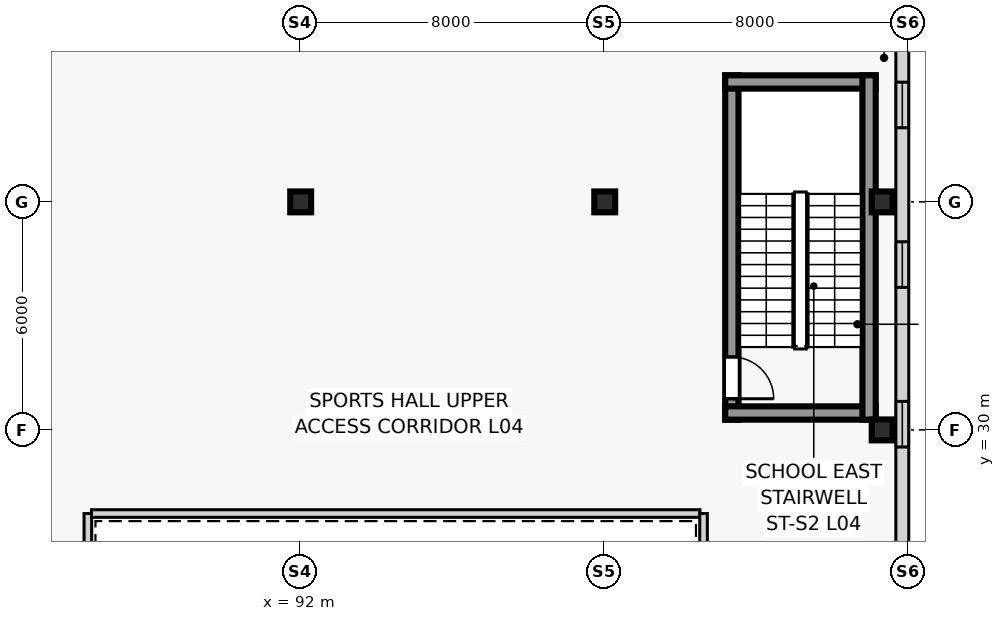
"""IFC4 building model, lengths in metres.
Left out: names, types, materials, properties, quantities, classifications, styles, units other than length and angle.
Written with IfcOpenShell. Run it as: python <this file> out.ifc"""

import sys

from ifc_helpers import new_model, si_unit, direction, frame, frame_2d, origin, origin_2d, place, context, subcontext, project, spatial, rectangle, extrude, source, transform, mapped, element, fill, save


model = new_model("IFC4")
c1 = context("Model", 3, precision=1e-05, world=origin(), true_north=direction((0.0, 1.0)))
c2 = subcontext(c1, "Body", "Model", "MODEL_VIEW")
j1 = project(units=[si_unit("LENGTHUNIT", "METRE"), si_unit("PLANEANGLEUNIT", "RADIAN")], contexts=[c1])
p1 = place(None, origin())
s1 = spatial("IfcSite", under=j1, at=p1, CompositionType="ELEMENT")
p2 = place(p1, origin())
s2 = spatial("IfcBuilding", under=s1, at=p2, CompositionType="ELEMENT")
p3 = place(p2, frame((0.0, 0.0, 18.0)))
s3 = spatial("IfcBuildingStorey", under=s2, at=p3, CompositionType="ELEMENT", Elevation=18.0)
p4 = place(p3, frame((103.345, 30.27, 0.0), z_axis=(0.0, 0.0, 1.0), x_axis=(0.0, 1.0, 0.0)))
e1 = element("IfcWall", 1, at=p4, inside=s3, PredefinedType="SHEAR", context=c2, shape_type="SweptSolid", body=[
    extrude(rectangle(XDim=9.06, YDim=0.35, at=frame_2d((4.53, 0.0))), origin(), (0.0, 0.0, 1.0), 4.5),
])
p5 = place(p4, frame((0.55, 0.0, 0.0)))
e2 = element("IfcOpeningElement", 2, at=p5, cuts=e1, PredefinedType="OPENING", context=c2, shape_type="SweptSolid", body=[
    extrude(rectangle(XDim=1.1, YDim=2.2, at=frame_2d((0.55, 1.1))), frame((0.0, 0.185, 0.0), z_axis=(0.0, -1.0, 0.0), x_axis=(1.0, 0.0, 0.0)), (0.0, 0.0, 1.0), 0.37),
])
for number, where, z_axis, x_axis in (
    (3, (103.17, 30.445, 0.0), (0.0, 0.0, 1.0), (1.0, 0.0, 0.0)),
    (4, (103.17, 39.155, 0.0), (0.0, 0.0, 1.0), (1.0, 0.0, 0.0)),
):
    element("IfcWall", number, at=place(p3, frame(where, z_axis=z_axis, x_axis=x_axis)), inside=s3, PredefinedType="SHEAR", context=c2, shape_type="SweptSolid", body=[
        extrude(rectangle(XDim=3.96, YDim=0.35, at=frame_2d((1.98, 0.0))), origin(), (0.0, 0.0, 1.0), 4.5),
    ])
p6 = place(p3, frame((106.955, 30.27, 0.0), z_axis=(0.0, 0.0, 1.0), x_axis=(0.0, 1.0, 0.0)))
e5 = element("IfcWall", 5, at=p6, inside=s3, PredefinedType="SHEAR", context=c2, shape_type="SweptSolid", body=[
    extrude(rectangle(XDim=9.06, YDim=0.35, at=frame_2d((4.53, 0.0))), origin(), (0.0, 0.0, 1.0), 4.5),
])
m1 = source(origin(), c2, "Body", "SweptSolid", [
    extrude(rectangle(XDim=0.55, YDim=0.55, at=origin_2d()), origin(), (0.0, 0.0, 1.0), 4.5),
])
for number, where, z_axis, x_axis in (
    (6, (92.0, 36.0, 0.0), (0.0, 0.0, 1.0), (1.0, 0.0, 0.0)),
    (7, (100.0, 36.0, 0.0), (0.0, 0.0, 1.0), (1.0, 0.0, 0.0)),
    (8, (107.3, 30.0, 0.0), (0.0, 0.0, 1.0), (1.0, 0.0, 0.0)),
    (9, (107.3, 36.0, 0.0), (0.0, 0.0, 1.0), (1.0, 0.0, 0.0)),
):
    element("IfcColumn", number, at=place(p3, frame(where, z_axis=z_axis, x_axis=x_axis)), inside=s3, PredefinedType="COLUMN", context=c2, shape_type="MappedRepresentation", body=[
        mapped(m1, transform((0.0, 0.0, 0.0), scale=1.0)),
    ])
p7 = place(p3, frame((107.83, 10.07, 0.0), z_axis=(0.0, 0.0, 1.0), x_axis=(0.0, 1.0, 0.0)))
e10 = element("IfcWall", 10, at=p7, inside=s3, PredefinedType="SOLIDWALL", context=c2, shape_type="SweptSolid", body=[
    extrude(rectangle(XDim=31.76, YDim=0.34, at=frame_2d((15.88, 0.0))), origin(), (0.0, 0.0, 1.0), 4.2),
])
p8 = place(p7, frame((2.68, 0.0, 0.95)))
e11 = element("IfcOpeningElement", 11, at=p8, cuts=e10, PredefinedType="OPENING", context=c2, shape_type="SweptSolid", body=[
    extrude(rectangle(XDim=1.2, YDim=1.5, at=frame_2d((0.6, 0.75))), frame((0.0, 0.18, 0.0), z_axis=(0.0, -1.0, 0.0), x_axis=(1.0, 0.0, 0.0)), (0.0, 0.0, 1.0), 0.36),
])
p9 = place(p7, frame((6.88, 0.0, 0.95)))
e12 = element("IfcOpeningElement", 12, at=p9, cuts=e10, PredefinedType="OPENING", context=c2, shape_type="SweptSolid", body=[
    extrude(rectangle(XDim=1.2, YDim=1.5, at=frame_2d((0.6, 0.75))), frame((0.0, 0.18, 0.0), z_axis=(0.0, -1.0, 0.0), x_axis=(1.0, 0.0, 0.0)), (0.0, 0.0, 1.0), 0.36),
])
p10 = place(p7, frame((11.08, 0.0, 0.95)))
e13 = element("IfcOpeningElement", 13, at=p10, cuts=e10, PredefinedType="OPENING", context=c2, shape_type="SweptSolid", body=[
    extrude(rectangle(XDim=1.2, YDim=1.5, at=frame_2d((0.6, 0.75))), frame((0.0, 0.18, 0.0), z_axis=(0.0, -1.0, 0.0), x_axis=(1.0, 0.0, 0.0)), (0.0, 0.0, 1.0), 0.36),
])
p11 = place(p7, frame((15.28, 0.0, 0.95)))
e14 = element("IfcOpeningElement", 14, at=p11, cuts=e10, PredefinedType="OPENING", context=c2, shape_type="SweptSolid", body=[
    extrude(rectangle(XDim=1.2, YDim=1.5, at=frame_2d((0.6, 0.75))), frame((0.0, 0.18, 0.0), z_axis=(0.0, -1.0, 0.0), x_axis=(1.0, 0.0, 0.0)), (0.0, 0.0, 1.0), 0.36),
])
p12 = place(p7, frame((19.48, 0.0, 0.95)))
e15 = element("IfcOpeningElement", 15, at=p12, cuts=e10, PredefinedType="OPENING", context=c2, shape_type="SweptSolid", body=[
    extrude(rectangle(XDim=1.2, YDim=1.5, at=frame_2d((0.6, 0.75))), frame((0.0, 0.18, 0.0), z_axis=(0.0, -1.0, 0.0), x_axis=(1.0, 0.0, 0.0)), (0.0, 0.0, 1.0), 0.36),
])
p13 = place(p7, frame((23.68, 0.0, 0.95)))
e16 = element("IfcOpeningElement", 16, at=p13, cuts=e10, PredefinedType="OPENING", context=c2, shape_type="SweptSolid", body=[
    extrude(rectangle(XDim=1.2, YDim=1.5, at=frame_2d((0.6, 0.75))), frame((0.0, 0.18, 0.0), z_axis=(0.0, -1.0, 0.0), x_axis=(1.0, 0.0, 0.0)), (0.0, 0.0, 1.0), 0.36),
])
p14 = place(p7, frame((27.88, 0.0, 0.95)))
e17 = element("IfcOpeningElement", 17, at=p14, cuts=e10, PredefinedType="OPENING", context=c2, shape_type="SweptSolid", body=[
    extrude(rectangle(XDim=1.2, YDim=1.5, at=frame_2d((0.6, 0.75))), frame((0.0, 0.18, 0.0), z_axis=(0.0, -1.0, 0.0), x_axis=(1.0, 0.0, 0.0)), (0.0, 0.0, 1.0), 0.36),
])
p15 = place(p3, frame((86.4, 13.8, 0.0), z_axis=(0.0, 0.0, 1.0), x_axis=(0.0, 1.0, 0.0)))
e18 = element("IfcWall", 18, at=p15, inside=s3, PredefinedType="PARTITIONING", context=c2, shape_type="SweptSolid", body=[
    extrude(rectangle(XDim=14.0, YDim=0.2, at=frame_2d((7.0, 0.0))), origin(), (0.0, 0.0, 1.0), 4.19),
])
p16 = place(p3, frame((86.495, 27.8, 0.0), z_axis=(0.0, 0.0, 1.0), x_axis=(1.0, 0.0, 0.0)))
e19 = element("IfcWall", 19, at=p16, inside=s3, PredefinedType="PARTITIONING", context=c2, shape_type="SweptSolid", body=[
    extrude(rectangle(XDim=16.01, YDim=0.2, at=frame_2d((8.005, 0.0))), origin(), (0.0, 0.0, 1.0), 4.19),
])
p17 = place(p3, frame((102.6, 13.8, 0.0), z_axis=(0.0, 0.0, 1.0), x_axis=(0.0, 1.0, 0.0)))
e20 = element("IfcWall", 20, at=p17, inside=s3, PredefinedType="PARTITIONING", context=c2, shape_type="SweptSolid", body=[
    extrude(rectangle(XDim=14.0, YDim=0.2, at=frame_2d((7.0, 0.0))), origin(), (0.0, 0.0, 1.0), 4.19),
])
m2 = source(origin(), c2, "Body", "SweptSolid", [
    extrude(rectangle(XDim=1.2, YDim=1.5, at=frame_2d((0.6, 0.75))), frame((0.0, 0.03, 0.0), z_axis=(0.0, -1.0, 0.0), x_axis=(1.0, 0.0, 0.0)), (0.0, 0.0, 1.0), 0.06),
])
p18 = place(p12, origin())
e21 = element("IfcWindow", 21, at=p18, inside=s3, PartitioningType="SINGLE_PANEL", PredefinedType="WINDOW", context=c2, shape_type="MappedRepresentation", body=[
    mapped(m2, transform((0.0, 0.0, 0.0), scale=1.0)),
])
fill(e15, e21)
p19 = place(p13, origin())
e22 = element("IfcWindow", 22, at=p19, inside=s3, PartitioningType="SINGLE_PANEL", PredefinedType="WINDOW", context=c2, shape_type="MappedRepresentation", body=[
    mapped(m2, transform((0.0, 0.0, 0.0), scale=1.0)),
])
fill(e16, e22)
p20 = place(p14, origin())
e23 = element("IfcWindow", 23, at=p20, inside=s3, PartitioningType="SINGLE_PANEL", PredefinedType="WINDOW", context=c2, shape_type="MappedRepresentation", body=[
    mapped(m2, transform((0.0, 0.0, 0.0), scale=1.0)),
])
fill(e17, e23)
m3 = source(origin(), c2, "Body", "SweptSolid", [
    extrude(rectangle(XDim=1.1, YDim=2.2, at=frame_2d((0.55, 1.1))), frame((0.0, 0.025, 0.0), z_axis=(0.0, -1.0, 0.0), x_axis=(1.0, 0.0, 0.0)), (0.0, 0.0, 1.0), 0.05),
])
p21 = place(p5, frame((1.1, 0.0, 0.0), z_axis=(0.0, 0.0, 1.0), x_axis=(-1.0, 0.0, 0.0)))
e24 = element("IfcDoor", 24, at=p21, inside=s3, OperationType="SINGLE_SWING_RIGHT", PredefinedType="DOOR", context=c2, shape_type="MappedRepresentation", body=[
    mapped(m3, transform((0.0, 0.0, 0.0), scale=1.0)),
])
fill(e2, e24)
save(model, sys.argv[1])
